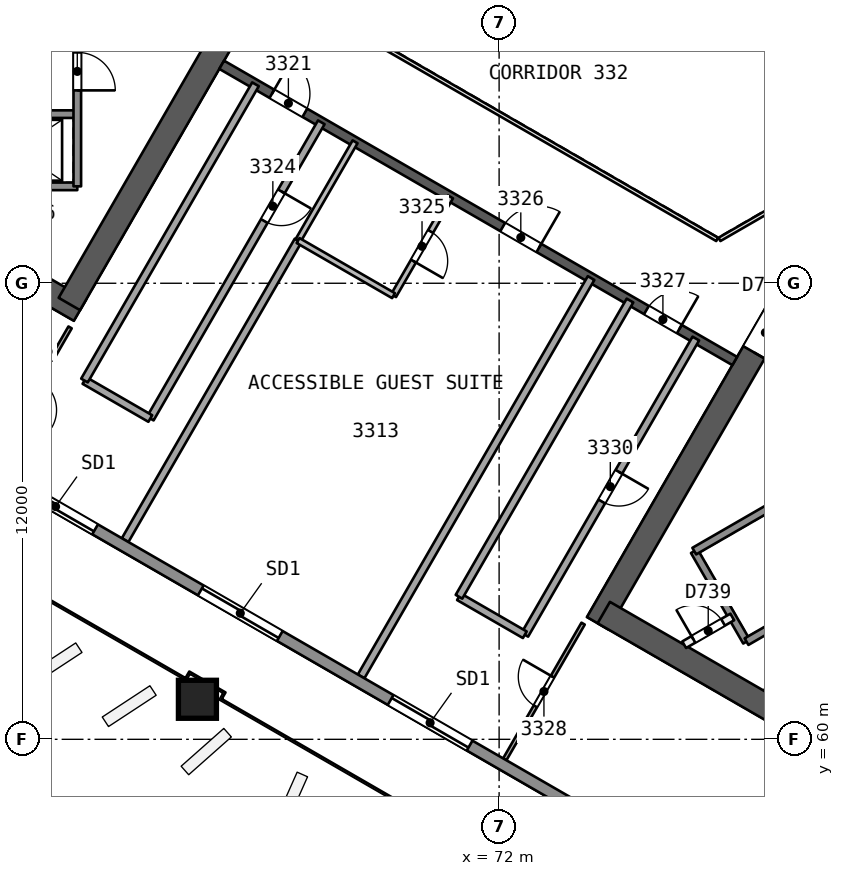
"""IFC4 building model, lengths in metres.
Left out: names, types, materials, properties, quantities, classifications, styles, units other than length and angle.
Written with IfcOpenShell. Run it as: python <this file> out.ifc"""

import sys

from ifc_helpers import new_model, si_unit, direction, frame, frame_2d, origin, origin_2d, place, context, subcontext, project, spatial, rectangle, extrude, element, fill, save


model = new_model("IFC4")
c1 = context("Model", 3, precision=1e-05, world=origin(), true_north=direction((0.0, 1.0)))
c2 = subcontext(c1, "Body", "Model", "MODEL_VIEW")
j1 = project(units=[si_unit("LENGTHUNIT", "METRE"), si_unit("PLANEANGLEUNIT", "RADIAN")], contexts=[c1])
p1 = place(None, origin())
s1 = spatial("IfcSite", under=j1, at=p1, CompositionType="ELEMENT")
p2 = place(p1, origin())
s2 = spatial("IfcBuilding", under=s1, at=p2, CompositionType="ELEMENT")
p3 = place(p2, frame((0.0, 0.0, 136.4)))
s3 = spatial("IfcBuildingStorey", under=s2, at=p3, CompositionType="ELEMENT", Elevation=136.4)
p4 = place(p3, frame((48.722, 78.365, 0.0), z_axis=(0.0, 0.0, 1.0), x_axis=(0.866020036431, -0.500009296414, 0.0)))
e1 = element("IfcWall", 1, at=p4, inside=s3, PredefinedType="SHEAR", context=c2, shape_type="SweptSolid", body=[
    extrude(rectangle(XDim=14.146, YDim=0.65, at=frame_2d((7.073, 0.0))), origin(), (0.0, 0.0, 1.0), 3.7),
])
p5 = place(p3, frame((60.691, 71.455, 0.0), z_axis=(0.0, 0.0, 1.0), x_axis=(0.499983075189, 0.866035175108, 0.0)))
e2 = element("IfcWall", 2, at=p5, inside=s3, PredefinedType="SHEAR", context=c2, shape_type="SweptSolid", body=[
    extrude(rectangle(XDim=10.055, YDim=0.65, at=frame_2d((5.027, 0.0))), origin(), (0.0, 0.0, 1.0), 3.7),
])
p6 = place(p5, frame((7.905, 0.0, 0.0)))
e3 = element("IfcOpeningElement", 3, at=p6, cuts=e2, PredefinedType="OPENING", context=c2, shape_type="SweptSolid", body=[
    extrude(rectangle(XDim=1.2, YDim=2.1, at=frame_2d((0.6, 1.05))), frame((0.0, 0.335, 0.0), z_axis=(0.0, -1.0, 0.0), x_axis=(1.0, 0.0, 0.0)), (0.0, 0.0, 1.0), 0.671),
])
p7 = place(p3, frame((79.688, 71.881, 0.0), z_axis=(0.0, 0.0, 1.0), x_axis=(-0.49999822179, -0.866026430432, 0.0)))
e4 = element("IfcWall", 4, at=p7, inside=s3, PredefinedType="SHEAR", context=c2, shape_type="SweptSolid", body=[
    extrude(rectangle(XDim=10.192, YDim=0.65, at=frame_2d((5.096, 0.0))), origin(), (0.0, 0.0, 1.0), 3.7),
])
p8 = place(p7, frame((0.762, 0.0, 0.0)))
e5 = element("IfcOpeningElement", 5, at=p8, cuts=e4, PredefinedType="OPENING", context=c2, shape_type="SweptSolid", body=[
    extrude(rectangle(XDim=1.2, YDim=2.1, at=frame_2d((0.6, 1.05))), frame((0.0, 0.335, 0.0), z_axis=(0.0, -1.0, 0.0), x_axis=(1.0, 0.0, 0.0)), (0.0, 0.0, 1.0), 0.671),
])
p9 = place(p3, frame((74.754, 63.335, 0.0), z_axis=(0.0, 0.0, 1.0), x_axis=(0.866026250715, -0.49999853307, 0.0)))
e6 = element("IfcWall", 6, at=p9, inside=s3, PredefinedType="SHEAR", context=c2, shape_type="SweptSolid", body=[
    extrude(rectangle(XDim=14.008, YDim=0.65, at=frame_2d((7.004, 0.0))), origin(), (0.0, 0.0, 1.0), 3.7),
])
p10 = place(p3, frame((64.7, 77.748, 0.0), z_axis=(0.0, 0.0, 1.0), x_axis=(0.866026492143, -0.499998114903, 0.0)))
e7 = element("IfcWall", 7, at=p10, inside=s3, PredefinedType="SHEAR", context=c2, shape_type="SweptSolid", body=[
    extrude(rectangle(XDim=15.588, YDim=0.25, at=frame_2d((7.794, 0.0))), origin(), (0.0, 0.0, 1.0), 3.25),
])
p11 = place(p10, frame((1.527, 0.0, 0.0)))
e8 = element("IfcOpeningElement", 8, at=p11, cuts=e7, PredefinedType="OPENING", context=c2, shape_type="SweptSolid", body=[
    extrude(rectangle(XDim=1.0, YDim=2.1, at=frame_2d((0.5, 1.05))), frame((0.0, 0.135, 0.0), z_axis=(0.0, -1.0, 0.0), x_axis=(1.0, 0.0, 0.0)), (0.0, 0.0, 1.0), 0.271),
])
p12 = place(p10, frame((8.538, 0.0, 0.0)))
e9 = element("IfcOpeningElement", 9, at=p12, cuts=e7, PredefinedType="OPENING", context=c2, shape_type="SweptSolid", body=[
    extrude(rectangle(XDim=1.1, YDim=2.1, at=frame_2d((0.55, 1.05))), frame((0.0, 0.135, 0.0), z_axis=(0.0, -1.0, 0.0), x_axis=(1.0, 0.0, 0.0)), (0.0, 0.0, 1.0), 0.271),
])
p13 = place(p10, frame((12.906, 0.0, 0.0)))
e10 = element("IfcOpeningElement", 10, at=p13, cuts=e7, PredefinedType="OPENING", context=c2, shape_type="SweptSolid", body=[
    extrude(rectangle(XDim=1.0, YDim=2.1, at=frame_2d((0.5, 1.05))), frame((0.0, 0.135, 0.0), z_axis=(0.0, -1.0, 0.0), x_axis=(1.0, 0.0, 0.0)), (0.0, 0.0, 1.0), 0.271),
])
p14 = place(p3, frame((64.049, 61.032, 0.0), z_axis=(0.010092954999, 0.017481261926, 0.999796248113), x_axis=(-0.866028445621, 0.499994731348, 2.47319e-07)))
e11 = element("IfcColumn", 11, at=p14, inside=s3, PredefinedType="COLUMN", context=c2, shape_type="SweptSolid", body=[
    extrude(rectangle(XDim=1.0, YDim=1.0, at=origin_2d()), origin(), (0.0, 0.0, 1.0), 3.701),
])
p15 = place(p3, frame((60.71, 70.838, 0.0), z_axis=(0.0, 0.0, 1.0), x_axis=(-0.499997465321, -0.866026867177, 0.0)))
e12 = element("IfcWall", 12, at=p15, inside=s3, PredefinedType="PARTITIONING", context=c2, shape_type="SweptSolid", body=[
    extrude(rectangle(XDim=4.124, YDim=0.1, at=frame_2d((2.062, 0.0))), origin(), (0.0, 0.0, 1.0), 3.25),
])
p16 = place(p15, frame((1.612, 0.0, 0.0)))
e13 = element("IfcOpeningElement", 13, at=p16, cuts=e12, PredefinedType="OPENING", context=c2, shape_type="SweptSolid", body=[
    extrude(rectangle(XDim=0.9, YDim=2.1, at=frame_2d((0.45, 1.05))), frame((0.0, 0.061, 0.0), z_axis=(0.0, -1.0, 0.0), x_axis=(1.0, 0.0, 0.0)), (0.0, 0.0, 1.0), 0.121),
])
p17 = place(p3, frame((67.321, 76.235, 0.0), z_axis=(0.0, 0.0, 1.0), x_axis=(-0.5000018851, -0.866024315419, 0.0)))
e14 = element("IfcWall", 14, at=p17, inside=s3, PredefinedType="PARTITIONING", context=c2, shape_type="SweptSolid", body=[
    extrude(rectangle(XDim=9.0, YDim=0.2, at=frame_2d((4.5, 0.0))), origin(), (0.0, 0.0, 1.0), 3.25),
])
p18 = place(p17, frame((2.1, 0.0, 0.0)))
e15 = element("IfcOpeningElement", 15, at=p18, cuts=e14, PredefinedType="OPENING", context=c2, shape_type="SweptSolid", body=[
    extrude(rectangle(XDim=0.9, YDim=2.1, at=frame_2d((0.45, 1.05))), frame((0.0, 0.11, 0.0), z_axis=(0.0, -1.0, 0.0), x_axis=(1.0, 0.0, 0.0)), (0.0, 0.0, 1.0), 0.221),
])
p19 = place(p3, frame((62.821, 68.441, 0.0), z_axis=(0.0, 0.0, 1.0), x_axis=(-0.866041268327, 0.499972520799, 0.0)))
e16 = element("IfcWall", 16, at=p19, inside=s3, PredefinedType="PARTITIONING", context=c2, shape_type="SweptSolid", body=[
    extrude(rectangle(XDim=2.0, YDim=0.2, at=frame_2d((1.0, 0.0))), origin(), (0.0, 0.0, 1.0), 3.25),
])
p20 = place(p3, frame((61.089, 69.441, 0.0), z_axis=(0.0, 0.0, 1.0), x_axis=(0.5000018851, 0.866024315419, 0.0)))
e17 = element("IfcWall", 17, at=p20, inside=s3, PredefinedType="PARTITIONING", context=c2, shape_type="SweptSolid", body=[
    extrude(rectangle(XDim=9.0, YDim=0.2, at=frame_2d((4.5, 0.0))), origin(), (0.0, 0.0, 1.0), 3.25),
])
p21 = place(p3, frame((62.158, 65.24, 0.0), z_axis=(0.0, 0.0, 1.0), x_axis=(0.500007237546, 0.866021225145, 0.0)))
e18 = element("IfcWall", 18, at=p21, inside=s3, PredefinedType="PARTITIONING", context=c2, shape_type="SweptSolid", body=[
    extrude(rectangle(XDim=9.103, YDim=0.2, at=frame_2d((4.551, 0.0))), origin(), (0.0, 0.0, 1.0), 3.25),
])
p22 = place(p3, frame((66.71, 73.124, 0.0), z_axis=(0.0, 0.0, 1.0), x_axis=(0.499990139034, 0.866031096941, 0.0)))
e19 = element("IfcWall", 19, at=p22, inside=s3, PredefinedType="PARTITIONING", context=c2, shape_type="SweptSolid", body=[
    extrude(rectangle(XDim=3.0, YDim=0.15, at=frame_2d((1.5, 0.0))), origin(), (0.0, 0.0, 1.0), 3.25),
])
p23 = place(p3, frame((70.721, 74.272, 0.0), z_axis=(0.0, 0.0, 1.0), x_axis=(-0.50002537861, -0.866010750942, 0.0)))
e20 = element("IfcWall", 20, at=p23, inside=s3, PredefinedType="PARTITIONING", context=c2, shape_type="SweptSolid", body=[
    extrude(rectangle(XDim=3.0, YDim=0.15, at=frame_2d((1.5, 0.0))), origin(), (0.0, 0.0, 1.0), 3.25),
])
p24 = place(p23, frame((1.05, 0.0, 0.0)))
e21 = element("IfcOpeningElement", 21, at=p24, cuts=e20, PredefinedType="OPENING", context=c2, shape_type="SweptSolid", body=[
    extrude(rectangle(XDim=0.9, YDim=2.1, at=frame_2d((0.45, 1.05))), frame((0.0, 0.085, 0.0), z_axis=(0.0, -1.0, 0.0), x_axis=(1.0, 0.0, 0.0)), (0.0, 0.0, 1.0), 0.171),
])
p25 = place(p3, frame((69.221, 71.674, 0.0), z_axis=(0.0, 0.0, 1.0), x_axis=(-0.866032775405, 0.499987231761, 0.0)))
e22 = element("IfcWall", 22, at=p25, inside=s3, PredefinedType="PARTITIONING", context=c2, shape_type="SweptSolid", body=[
    extrude(rectangle(XDim=2.9, YDim=0.15, at=frame_2d((1.45, 0.0))), origin(), (0.0, 0.0, 1.0), 3.25),
])
p26 = place(p3, frame((68.369, 61.655, 0.0), z_axis=(0.0, 0.0, 1.0), x_axis=(0.499987870058, 0.866032406896, 0.0)))
e23 = element("IfcWall", 23, at=p26, inside=s3, PredefinedType="PARTITIONING", context=c2, shape_type="SweptSolid", body=[
    extrude(rectangle(XDim=12.103, YDim=0.2, at=frame_2d((6.051, 0.0))), origin(), (0.0, 0.0, 1.0), 3.25),
])
p27 = place(p3, frame((72.148, 59.473, 0.0), z_axis=(0.0, 0.0, 1.0), x_axis=(0.499997465321, 0.866026867177, 0.0)))
e24 = element("IfcWall", 24, at=p27, inside=s3, PredefinedType="PARTITIONING", context=c2, shape_type="SweptSolid", body=[
    extrude(rectangle(XDim=4.124, YDim=0.1, at=frame_2d((2.062, 0.0))), origin(), (0.0, 0.0, 1.0), 3.25),
])
p28 = place(p27, frame((1.612, 0.0, 0.0)))
e25 = element("IfcOpeningElement", 25, at=p28, cuts=e24, PredefinedType="OPENING", context=c2, shape_type="SweptSolid", body=[
    extrude(rectangle(XDim=0.9, YDim=2.1, at=frame_2d((0.45, 1.05))), frame((0.0, 0.061, 0.0), z_axis=(0.0, -1.0, 0.0), x_axis=(1.0, 0.0, 0.0)), (0.0, 0.0, 1.0), 0.121),
])
p29 = place(p3, frame((77.176, 70.545, 0.0), z_axis=(0.0, 0.0, 1.0), x_axis=(-0.499990139034, -0.866031096941, 0.0)))
e26 = element("IfcWall", 26, at=p29, inside=s3, PredefinedType="PARTITIONING", context=c2, shape_type="SweptSolid", body=[
    extrude(rectangle(XDim=9.0, YDim=0.2, at=frame_2d((4.5, 0.0))), origin(), (0.0, 0.0, 1.0), 3.25),
])
p30 = place(p29, frame((4.05, 0.0, 0.0)))
e27 = element("IfcOpeningElement", 27, at=p30, cuts=e26, PredefinedType="OPENING", context=c2, shape_type="SweptSolid", body=[
    extrude(rectangle(XDim=0.9, YDim=2.1, at=frame_2d((0.45, 1.05))), frame((0.0, 0.11, 0.0), z_axis=(0.0, -1.0, 0.0), x_axis=(1.0, 0.0, 0.0)), (0.0, 0.0, 1.0), 0.221),
])
p31 = place(p3, frame((72.676, 62.751, 0.0), z_axis=(0.0, 0.0, 1.0), x_axis=(-0.866010750942, 0.50002537861, 0.0)))
e28 = element("IfcWall", 28, at=p31, inside=s3, PredefinedType="PARTITIONING", context=c2, shape_type="SweptSolid", body=[
    extrude(rectangle(XDim=2.0, YDim=0.2, at=frame_2d((1.0, 0.0))), origin(), (0.0, 0.0, 1.0), 3.25),
])
p32 = place(p3, frame((70.944, 63.751, 0.0), z_axis=(0.0, 0.0, 1.0), x_axis=(0.499990139034, 0.866031096941, 0.0)))
e29 = element("IfcWall", 29, at=p32, inside=s3, PredefinedType="PARTITIONING", context=c2, shape_type="SweptSolid", body=[
    extrude(rectangle(XDim=9.0, YDim=0.2, at=frame_2d((4.5, 0.0))), origin(), (0.0, 0.0, 1.0), 3.25),
])
p33 = place(p3, frame((89.421, 49.328, 0.0), z_axis=(0.0, 0.0, 1.0), x_axis=(-0.866024492862, 0.50000157776, 0.0)))
e30 = element("IfcWall", 30, at=p33, inside=s3, PredefinedType="SOLIDWALL", context=c2, shape_type="SweptSolid", body=[
    extrude(rectangle(XDim=55.649, YDim=0.3, at=frame_2d((27.825, 0.0))), origin(), (0.0, 0.0, 1.0), 3.25),
])
p34 = place(p33, frame((26.781, 0.0, 0.0)))
e31 = element("IfcOpeningElement", 31, at=p34, cuts=e30, PredefinedType="OPENING", context=c2, shape_type="SweptSolid", body=[
    extrude(rectangle(XDim=2.4, YDim=2.4, at=frame_2d((1.2, 1.2))), frame((0.0, 0.161, 0.0), z_axis=(0.0, -1.0, 0.0), x_axis=(1.0, 0.0, 0.0)), (0.0, 0.0, 1.0), 0.321),
])
p35 = place(p33, frame((32.392, 0.0, 0.0)))
e32 = element("IfcOpeningElement", 32, at=p35, cuts=e30, PredefinedType="OPENING", context=c2, shape_type="SweptSolid", body=[
    extrude(rectangle(XDim=2.4, YDim=2.4, at=frame_2d((1.2, 1.2))), frame((0.0, 0.161, 0.0), z_axis=(0.0, -1.0, 0.0), x_axis=(1.0, 0.0, 0.0)), (0.0, 0.0, 1.0), 0.321),
])
p36 = place(p33, frame((43.22, 0.0, 0.0)))
e33 = element("IfcOpeningElement", 33, at=p36, cuts=e30, PredefinedType="OPENING", context=c2, shape_type="SweptSolid", body=[
    extrude(rectangle(XDim=2.4, YDim=2.4, at=frame_2d((1.2, 1.2))), frame((0.0, 0.161, 0.0), z_axis=(0.0, -1.0, 0.0), x_axis=(1.0, 0.0, 0.0)), (0.0, 0.0, 1.0), 0.321),
])
p37 = place(p33, frame((21.013, 0.0, 0.0)))
e34 = element("IfcOpeningElement", 34, at=p37, cuts=e30, PredefinedType="OPENING", context=c2, shape_type="SweptSolid", body=[
    extrude(rectangle(XDim=2.4, YDim=2.4, at=frame_2d((1.2, 1.2))), frame((0.0, 0.161, 0.0), z_axis=(0.0, -1.0, 0.0), x_axis=(1.0, 0.0, 0.0)), (0.0, 0.0, 1.0), 0.321),
])
p38 = place(p33, frame((10.021, 0.0, 0.0)))
e35 = element("IfcOpeningElement", 35, at=p38, cuts=e30, PredefinedType="OPENING", context=c2, shape_type="SweptSolid", body=[
    extrude(rectangle(XDim=2.4, YDim=2.4, at=frame_2d((1.2, 1.2))), frame((0.0, 0.161, 0.0), z_axis=(0.0, -1.0, 0.0), x_axis=(1.0, 0.0, 0.0)), (0.0, 0.0, 1.0), 0.321),
])
for number, where, z_axis, x_axis in (
    (36, (60.9, 76.45, 0.0), (0.0, 0.0, 1.0), (-1.0, 0.0, 0.0)),
    (37, (60.9, 74.55, 0.0), (0.0, 0.0, 1.0), (-1.0, 0.0, 0.0)),
):
    element("IfcWall", number, at=place(p3, frame(where, z_axis=z_axis, x_axis=x_axis)), inside=s3, PredefinedType="SOLIDWALL", context=c2, shape_type="SweptSolid", body=[
        extrude(rectangle(XDim=3.05, YDim=0.2, at=frame_2d((1.525, 0.0))), origin(), (0.0, 0.0, 1.0), 3.25),
    ])
p39 = place(p3, frame((60.9, 85.45, 0.0), z_axis=(0.0, 0.0, 1.0), x_axis=(0.0, -1.0, 0.0)))
e38 = element("IfcWall", 38, at=p39, inside=s3, PredefinedType="SOLIDWALL", context=c2, shape_type="SweptSolid", body=[
    extrude(rectangle(XDim=10.9, YDim=0.2, at=frame_2d((5.45, 0.0))), origin(), (0.0, 0.0, 1.0), 3.25),
])
p40 = place(p39, frame((2.875, 0.0, 0.0)))
e39 = element("IfcOpeningElement", 39, at=p40, cuts=e38, PredefinedType="OPENING", context=c2, shape_type="SweptSolid", body=[
    extrude(rectangle(XDim=1.0, YDim=2.1, at=frame_2d((0.5, 1.05))), frame((0.0, 0.11, 0.0), z_axis=(0.0, -1.0, 0.0), x_axis=(1.0, 0.0, 0.0)), (0.0, 0.0, 1.0), 0.221),
])
p41 = place(p39, frame((7.375, 0.0, 0.0)))
e40 = element("IfcOpeningElement", 40, at=p41, cuts=e38, PredefinedType="OPENING", context=c2, shape_type="SweptSolid", body=[
    extrude(rectangle(XDim=1.0, YDim=2.1, at=frame_2d((0.5, 1.05))), frame((0.0, 0.11, 0.0), z_axis=(0.0, -1.0, 0.0), x_axis=(1.0, 0.0, 0.0)), (0.0, 0.0, 1.0), 0.221),
])
p42 = place(p3, frame((77.135, 64.952, 0.0), z_axis=(0.0, 0.0, 1.0), x_axis=(0.499996545922, -0.866027397988, 0.0)))
e41 = element("IfcWall", 41, at=p42, inside=s3, PredefinedType="SOLIDWALL", context=c2, shape_type="SweptSolid", body=[
    extrude(rectangle(XDim=2.75, YDim=0.2, at=frame_2d((1.375, 0.0))), origin(), (0.0, 0.0, 1.0), 3.25),
])
p43 = place(p3, frame((77.135, 64.952, 0.0), z_axis=(0.0, 0.0, 1.0), x_axis=(0.866031916153, 0.499988720078, 0.0)))
e42 = element("IfcWall", 42, at=p43, inside=s3, PredefinedType="SOLIDWALL", context=c2, shape_type="SweptSolid", body=[
    extrude(rectangle(XDim=11.35, YDim=0.2, at=frame_2d((5.675, 0.0))), origin(), (0.0, 0.0, 1.0), 3.25),
])
p44 = place(p3, frame((76.87, 62.489, 0.0), z_axis=(0.0, 0.0, 1.0), x_axis=(0.866054810376, 0.49994906283, 0.0)))
e43 = element("IfcWall", 43, at=p44, inside=s3, PredefinedType="PARTITIONING", context=c2, shape_type="SweptSolid", body=[
    extrude(rectangle(XDim=1.461, YDim=0.2, at=frame_2d((0.73, 0.0))), origin(), (0.0, 0.0, 1.0), 3.25),
])
p45 = place(p44, frame((0.281, 0.0, 0.0)))
e44 = element("IfcOpeningElement", 44, at=p45, cuts=e43, PredefinedType="OPENING", context=c2, shape_type="SweptSolid", body=[
    extrude(rectangle(XDim=0.9, YDim=2.1, at=frame_2d((0.45, 1.05))), frame((0.0, 0.11, 0.0), z_axis=(0.0, -1.0, 0.0), x_axis=(1.0, 0.0, 0.0)), (0.0, 0.0, 1.0), 0.221),
])
p46 = place(p3, frame((78.51, 62.57, 0.0), z_axis=(0.0, 0.0, 1.0), x_axis=(0.866053019151, 0.499952165731, 0.0)))
e45 = element("IfcWall", 45, at=p46, inside=s3, PredefinedType="SOLIDWALL", context=c2, shape_type="SweptSolid", body=[
    extrude(rectangle(XDim=2.3, YDim=0.2, at=frame_2d((1.15, 0.0))), origin(), (0.0, 0.0, 1.0), 3.25),
])
p47 = place(p3, frame((67.702, 78.948, 0.0), z_axis=(0.0, 0.0, 1.0), x_axis=(0.866026658274, -0.499997827154, 0.0)))
e46 = element("IfcWall", 46, at=p47, inside=s3, PredefinedType="PARTITIONING", context=c2, shape_type="SweptSolid", body=[
    extrude(rectangle(XDim=11.588, YDim=0.1, at=frame_2d((5.794, 0.0))), origin(), (0.0, 0.0, 1.0), 3.25),
])
p48 = place(p3, frame((77.798, 73.154, 0.0), z_axis=(0.0, 0.0, 1.0), x_axis=(0.866041268327, 0.499972520799, 0.0)))
e47 = element("IfcWall", 47, at=p48, inside=s3, PredefinedType="PARTITIONING", context=c2, shape_type="SweptSolid", body=[
    extrude(rectangle(XDim=2.0, YDim=0.1, at=frame_2d((1.0, 0.0))), origin(), (0.0, 0.0, 1.0), 3.25),
])
p49 = place(p11, origin())
e48 = element("IfcDoor", 48, at=p49, inside=s3, OperationType="SINGLE_SWING_LEFT", PredefinedType="NOTDEFINED", context=c2, shape_type="SweptSolid", body=[
    extrude(rectangle(XDim=1.0, YDim=2.1, at=frame_2d((0.5, 1.05))), frame((0.0, 0.025, 0.0), z_axis=(0.0, -1.0, 0.0), x_axis=(1.0, 0.0, 0.0)), (0.0, 0.0, 1.0), 0.05),
])
fill(e8, e48)
p50 = place(p18, origin())
e49 = element("IfcDoor", 49, at=p50, inside=s3, OperationType="SINGLE_SWING_LEFT", PredefinedType="NOTDEFINED", context=c2, shape_type="SweptSolid", body=[
    extrude(rectangle(XDim=0.9, YDim=2.1, at=frame_2d((0.45, 1.05))), frame((0.0, 0.025, 0.0), z_axis=(0.0, -1.0, 0.0), x_axis=(1.0, 0.0, 0.0)), (0.0, 0.0, 1.0), 0.05),
])
fill(e15, e49)
p51 = place(p24, origin())
e50 = element("IfcDoor", 50, at=p51, inside=s3, OperationType="SINGLE_SWING_RIGHT", PredefinedType="NOTDEFINED", context=c2, shape_type="SweptSolid", body=[
    extrude(rectangle(XDim=0.9, YDim=2.1, at=frame_2d((0.45, 1.05))), frame((0.0, 0.025, 0.0), z_axis=(0.0, -1.0, 0.0), x_axis=(1.0, 0.0, 0.0)), (0.0, 0.0, 1.0), 0.05),
])
fill(e21, e50)
p52 = place(p12, origin())
e51 = element("IfcDoor", 51, at=p52, inside=s3, OperationType="SINGLE_SWING_RIGHT", PredefinedType="NOTDEFINED", context=c2, shape_type="SweptSolid", body=[
    extrude(rectangle(XDim=1.1, YDim=2.1, at=frame_2d((0.55, 1.05))), frame((0.0, 0.025, 0.0), z_axis=(0.0, -1.0, 0.0), x_axis=(1.0, 0.0, 0.0)), (0.0, 0.0, 1.0), 0.05),
])
fill(e9, e51)
p53 = place(p13, origin())
e52 = element("IfcDoor", 52, at=p53, inside=s3, OperationType="SINGLE_SWING_RIGHT", PredefinedType="NOTDEFINED", context=c2, shape_type="SweptSolid", body=[
    extrude(rectangle(XDim=1.0, YDim=2.1, at=frame_2d((0.5, 1.05))), frame((0.0, 0.025, 0.0), z_axis=(0.0, -1.0, 0.0), x_axis=(1.0, 0.0, 0.0)), (0.0, 0.0, 1.0), 0.05),
])
fill(e10, e52)
p54 = place(p28, origin())
e53 = element("IfcDoor", 53, at=p54, inside=s3, OperationType="SINGLE_SWING_RIGHT", PredefinedType="NOTDEFINED", context=c2, shape_type="SweptSolid", body=[
    extrude(rectangle(XDim=0.9, YDim=2.1, at=frame_2d((0.45, 1.05))), frame((0.0, 0.025, 0.0), z_axis=(0.0, -1.0, 0.0), x_axis=(1.0, 0.0, 0.0)), (0.0, 0.0, 1.0), 0.05),
])
fill(e25, e53)
p55 = place(p30, origin())
e54 = element("IfcDoor", 54, at=p55, inside=s3, OperationType="SINGLE_SWING_LEFT", PredefinedType="NOTDEFINED", context=c2, shape_type="SweptSolid", body=[
    extrude(rectangle(XDim=0.9, YDim=2.1, at=frame_2d((0.45, 1.05))), frame((0.0, 0.025, 0.0), z_axis=(0.0, -1.0, 0.0), x_axis=(1.0, 0.0, 0.0)), (0.0, 0.0, 1.0), 0.05),
])
fill(e27, e54)
p56 = place(p34, origin())
e55 = element("IfcDoor", 55, at=p56, inside=s3, OperationType="SLIDING_TO_LEFT", PredefinedType="NOTDEFINED", context=c2, shape_type="SweptSolid", body=[
    extrude(rectangle(XDim=2.4, YDim=2.4, at=frame_2d((1.2, 1.2))), frame((0.0, 0.025, 0.0), z_axis=(0.0, -1.0, 0.0), x_axis=(1.0, 0.0, 0.0)), (0.0, 0.0, 1.0), 0.05),
])
fill(e31, e55)
p57 = place(p35, origin())
e56 = element("IfcDoor", 56, at=p57, inside=s3, OperationType="SLIDING_TO_RIGHT", PredefinedType="NOTDEFINED", context=c2, shape_type="SweptSolid", body=[
    extrude(rectangle(XDim=2.4, YDim=2.4, at=frame_2d((1.2, 1.2))), frame((0.0, 0.025, 0.0), z_axis=(0.0, -1.0, 0.0), x_axis=(1.0, 0.0, 0.0)), (0.0, 0.0, 1.0), 0.05),
])
fill(e32, e56)
p58 = place(p37, origin())
e57 = element("IfcDoor", 57, at=p58, inside=s3, OperationType="SLIDING_TO_RIGHT", PredefinedType="NOTDEFINED", context=c2, shape_type="SweptSolid", body=[
    extrude(rectangle(XDim=2.4, YDim=2.4, at=frame_2d((1.2, 1.2))), frame((0.0, 0.025, 0.0), z_axis=(0.0, -1.0, 0.0), x_axis=(1.0, 0.0, 0.0)), (0.0, 0.0, 1.0), 0.05),
])
fill(e34, e57)
p59 = place(p41, origin())
e58 = element("IfcDoor", 58, at=p59, inside=s3, OperationType="SINGLE_SWING_RIGHT", PredefinedType="NOTDEFINED", context=c2, shape_type="SweptSolid", body=[
    extrude(rectangle(XDim=1.0, YDim=2.1, at=frame_2d((0.5, 1.05))), frame((0.0, 0.025, 0.0), z_axis=(0.0, -1.0, 0.0), x_axis=(1.0, 0.0, 0.0)), (0.0, 0.0, 1.0), 0.05),
])
fill(e40, e58)
p60 = place(p8, origin())
e59 = element("IfcDoor", 59, at=p60, inside=s3, OperationType="SINGLE_SWING_RIGHT", PredefinedType="NOTDEFINED", context=c2, shape_type="SweptSolid", body=[
    extrude(rectangle(XDim=1.2, YDim=2.1, at=frame_2d((0.6, 1.05))), frame((0.0, 0.025, 0.0), z_axis=(0.0, -1.0, 0.0), x_axis=(1.0, 0.0, 0.0)), (0.0, 0.0, 1.0), 0.05),
])
fill(e5, e59)
p61 = place(p45, origin())
e60 = element("IfcDoor", 60, at=p61, inside=s3, OperationType="SINGLE_SWING_LEFT", PredefinedType="NOTDEFINED", context=c2, shape_type="SweptSolid", body=[
    extrude(rectangle(XDim=0.9, YDim=2.1, at=frame_2d((0.45, 1.05))), frame((0.0, 0.025, 0.0), z_axis=(0.0, -1.0, 0.0), x_axis=(1.0, 0.0, 0.0)), (0.0, 0.0, 1.0), 0.05),
])
fill(e44, e60)
save(model, sys.argv[1])
